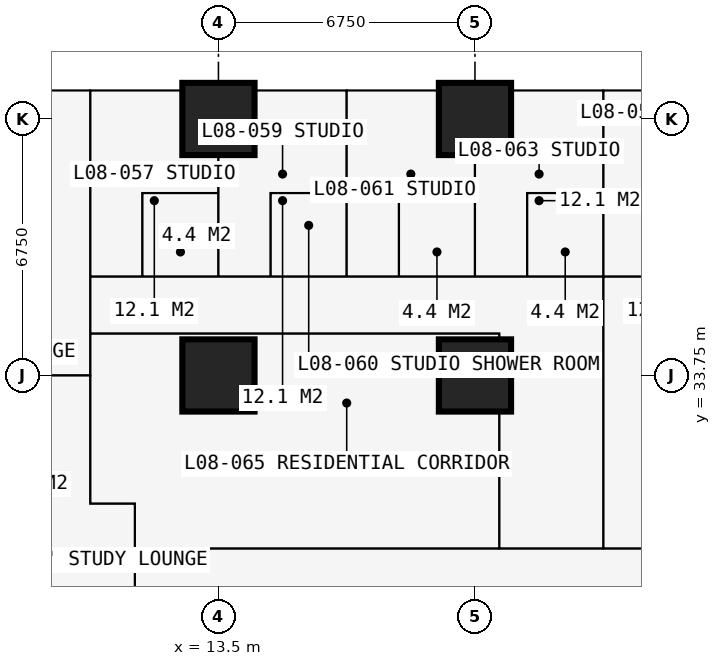
"""IFC4 building model, lengths in metres.
Left out: names, types, materials, properties, quantities, classifications, styles, units other than length and angle.
Written with IfcOpenShell. Run it as: python <this file> out.ifc"""

import sys

from ifc_helpers import new_model, si_unit, direction, frame, frame_2d, origin, origin_2d, place, context, subcontext, project, spatial, rectangle, extrude, element, fill, save


model = new_model("IFC4")
c1 = context("Model", 3, precision=1e-05, world=origin(), true_north=direction((0.0, 1.0)))
c2 = subcontext(c1, "Body", "Model", "MODEL_VIEW")
j1 = project(units=[si_unit("LENGTHUNIT", "METRE"), si_unit("PLANEANGLEUNIT", "RADIAN")], contexts=[c1])
p1 = place(None, origin())
s1 = spatial("IfcSite", under=j1, at=p1, CompositionType="ELEMENT")
p2 = place(p1, origin())
s2 = spatial("IfcBuilding", under=s1, at=p2, CompositionType="ELEMENT")
p3 = place(p2, frame((0.0, 0.0, 32.4)))
s3 = spatial("IfcBuildingStorey", under=s2, at=p3, CompositionType="ELEMENT", Elevation=32.4)
for number, where, z_axis, x_axis in (
    (1, (13.5, 33.75, 0.0), (0.0, 0.0, 1.0), (1.0, 0.0, 0.0)),
    (2, (13.5, 40.5, 0.0), (0.0, 0.0, 1.0), (1.0, 0.0, 0.0)),
    (3, (20.25, 33.75, 0.0), (0.0, 0.0, 1.0), (1.0, 0.0, 0.0)),
    (4, (20.25, 40.5, 0.0), (0.0, 0.0, 1.0), (1.0, 0.0, 0.0)),
):
    element("IfcColumn", number, at=place(p3, frame(where, z_axis=z_axis, x_axis=x_axis)), inside=s3, PredefinedType="COLUMN", context=c2, shape_type="SweptSolid", body=[
        extrude(rectangle(XDim=1.9, YDim=1.9, at=origin_2d()), origin(), (0.0, 0.0, 1.0), 3.6),
    ])
p4 = place(p3, frame((13.5, 41.25, 0.0), z_axis=(0.0, 0.0, 1.0), x_axis=(1.0, 0.0, 0.0)))
e5 = element("IfcWall", 5, at=p4, inside=s3, PredefinedType="SOLIDWALL", context=c2, shape_type="SweptSolid", body=[
    extrude(rectangle(XDim=6.75, YDim=0.15, at=frame_2d((3.375, 0.0))), origin(), (0.0, 0.0, 1.0), 3.375),
])
p5 = place(p4, frame((0.996, 0.0, 0.0)))
e6 = element("IfcOpeningElement", 6, at=p5, cuts=e5, PredefinedType="OPENING", context=c2, shape_type="SweptSolid", body=[
    extrude(rectangle(XDim=1.0, YDim=2.2, at=frame_2d((0.5, 1.1))), frame((0.0, 0.085, 0.0), z_axis=(0.0, -1.0, 0.0), x_axis=(1.0, 0.0, 0.0)), (0.0, 0.0, 1.0), 0.17),
])
p6 = place(p4, frame((2.042, 0.0, 0.9)))
e7 = element("IfcOpeningElement", 7, at=p6, cuts=e5, PredefinedType="OPENING", context=c2, shape_type="SweptSolid", body=[
    extrude(rectangle(XDim=1.2, YDim=1.8, at=frame_2d((0.6, 0.9))), frame((0.0, 0.085, 0.0), z_axis=(0.0, -1.0, 0.0), x_axis=(1.0, 0.0, 0.0)), (0.0, 0.0, 1.0), 0.17),
])
p7 = place(p4, frame((4.754, 0.0, 0.0)))
e8 = element("IfcOpeningElement", 8, at=p7, cuts=e5, PredefinedType="OPENING", context=c2, shape_type="SweptSolid", body=[
    extrude(rectangle(XDim=1.0, YDim=2.2, at=frame_2d((0.5, 1.1))), frame((0.0, 0.085, 0.0), z_axis=(0.0, -1.0, 0.0), x_axis=(1.0, 0.0, 0.0)), (0.0, 0.0, 1.0), 0.17),
])
p8 = place(p4, frame((3.508, 0.0, 0.9)))
e9 = element("IfcOpeningElement", 9, at=p8, cuts=e5, PredefinedType="OPENING", context=c2, shape_type="SweptSolid", body=[
    extrude(rectangle(XDim=1.2, YDim=1.8, at=frame_2d((0.6, 0.9))), frame((0.0, 0.085, 0.0), z_axis=(0.0, -1.0, 0.0), x_axis=(1.0, 0.0, 0.0)), (0.0, 0.0, 1.0), 0.17),
])
p9 = place(p3, frame((16.875, 41.35, 0.0), z_axis=(0.0, 0.0, 1.0), x_axis=(0.0, 1.0, 0.0)))
e10 = element("IfcWall", 10, at=p9, inside=s3, PredefinedType="USERDEFINED", context=c2, shape_type="SweptSolid", body=[
    extrude(rectangle(XDim=2.2, YDim=1.0, at=frame_2d((1.1, 0.0))), origin(), (0.0, 0.0, 1.0), 0.9),
])
p10 = place(p3, frame((4.15, 33.75, 0.0), z_axis=(0.0, 0.0, 1.0), x_axis=(1.0, 0.0, 0.0)))
e11 = element("IfcWall", 11, at=p10, inside=s3, PredefinedType="PARTITIONING", context=c2, shape_type="SweptSolid", body=[
    extrude(rectangle(XDim=5.975, YDim=0.15, at=frame_2d((2.988, 0.0))), origin(), (0.0, 0.0, 1.0), 2.877),
])
p11 = place(p3, frame((10.125, 30.375, 0.0), z_axis=(0.0, 0.0, 1.0), x_axis=(0.0, 1.0, 0.0)))
e12 = element("IfcWall", 12, at=p11, inside=s3, PredefinedType="PARTITIONING", context=c2, shape_type="SweptSolid", body=[
    extrude(rectangle(XDim=10.859, YDim=0.15, at=frame_2d((5.429, 0.0))), origin(), (0.0, 0.0, 1.0), 3.375),
])
p12 = place(p3, frame((10.125, 30.375, 0.0), z_axis=(0.0, 0.0, 1.0), x_axis=(1.0, 0.0, 0.0)))
e13 = element("IfcWall", 13, at=p12, inside=s3, PredefinedType="PARTITIONING", context=c2, shape_type="SweptSolid", body=[
    extrude(rectangle(XDim=1.175, YDim=0.15, at=frame_2d((0.587, 0.0))), origin(), (0.0, 0.0, 1.0), 3.375),
])
p13 = place(p3, frame((10.125, 34.85, 0.0), z_axis=(0.0, 0.0, 1.0), x_axis=(1.0, 0.0, 0.0)))
e14 = element("IfcWall", 14, at=p13, inside=s3, PredefinedType="PARTITIONING", context=c2, shape_type="SweptSolid", body=[
    extrude(rectangle(XDim=10.762, YDim=0.15, at=frame_2d((5.381, 0.0))), origin(), (0.0, 0.0, 1.0), 3.375),
])
p14 = place(p13, frame((4.9, 0.0, 0.0)))
e15 = element("IfcOpeningElement", 15, at=p14, cuts=e14, PredefinedType="OPENING", context=c2, shape_type="SweptSolid", body=[
    extrude(rectangle(XDim=0.95, YDim=2.2, at=frame_2d((0.475, 1.1))), frame((0.0, 0.085, 0.0), z_axis=(0.0, -1.0, 0.0), x_axis=(1.0, 0.0, 0.0)), (0.0, 0.0, 1.0), 0.17),
])
p15 = place(p3, frame((10.125, 36.35, 0.0), z_axis=(0.0, 0.0, 1.0), x_axis=(1.0, 0.0, 0.0)))
e16 = element("IfcWall", 16, at=p15, inside=s3, PredefinedType="PARTITIONING", context=c2, shape_type="SweptSolid", body=[
    extrude(rectangle(XDim=23.625, YDim=0.1, at=frame_2d((11.812, 0.0))), origin(), (0.0, 0.0, 1.0), 3.375),
])
p16 = place(p15, frame((20.5, 0.0, 0.0)))
e17 = element("IfcOpeningElement", 17, at=p16, cuts=e16, PredefinedType="OPENING", context=c2, shape_type="SweptSolid", body=[
    extrude(rectangle(XDim=0.95, YDim=2.2, at=frame_2d((0.475, 1.1))), frame((0.0, 0.06, 0.0), z_axis=(0.0, -1.0, 0.0), x_axis=(1.0, 0.0, 0.0)), (0.0, 0.0, 1.0), 0.12),
])
p17 = place(p15, frame((17.125, 0.0, 0.0)))
e18 = element("IfcOpeningElement", 18, at=p17, cuts=e16, PredefinedType="OPENING", context=c2, shape_type="SweptSolid", body=[
    extrude(rectangle(XDim=0.95, YDim=2.2, at=frame_2d((0.475, 1.1))), frame((0.0, 0.06, 0.0), z_axis=(0.0, -1.0, 0.0), x_axis=(1.0, 0.0, 0.0)), (0.0, 0.0, 1.0), 0.12),
])
p18 = place(p15, frame((13.7, 0.0, 0.0)))
e19 = element("IfcOpeningElement", 19, at=p18, cuts=e16, PredefinedType="OPENING", context=c2, shape_type="SweptSolid", body=[
    extrude(rectangle(XDim=0.95, YDim=2.2, at=frame_2d((0.475, 1.1))), frame((0.0, 0.06, 0.0), z_axis=(0.0, -1.0, 0.0), x_axis=(1.0, 0.0, 0.0)), (0.0, 0.0, 1.0), 0.12),
])
p19 = place(p15, frame((0.2, 0.0, 0.0)))
e20 = element("IfcOpeningElement", 20, at=p19, cuts=e16, PredefinedType="OPENING", context=c2, shape_type="SweptSolid", body=[
    extrude(rectangle(XDim=0.95, YDim=2.2, at=frame_2d((0.475, 1.1))), frame((0.0, 0.06, 0.0), z_axis=(0.0, -1.0, 0.0), x_axis=(1.0, 0.0, 0.0)), (0.0, 0.0, 1.0), 0.12),
])
p20 = place(p15, frame((3.625, 0.0, 0.0)))
e21 = element("IfcOpeningElement", 21, at=p20, cuts=e16, PredefinedType="OPENING", context=c2, shape_type="SweptSolid", body=[
    extrude(rectangle(XDim=0.95, YDim=2.2, at=frame_2d((0.475, 1.1))), frame((0.0, 0.06, 0.0), z_axis=(0.0, -1.0, 0.0), x_axis=(1.0, 0.0, 0.0)), (0.0, 0.0, 1.0), 0.12),
])
p21 = place(p15, frame((7.0, 0.0, 0.0)))
e22 = element("IfcOpeningElement", 22, at=p21, cuts=e16, PredefinedType="OPENING", context=c2, shape_type="SweptSolid", body=[
    extrude(rectangle(XDim=0.95, YDim=2.2, at=frame_2d((0.475, 1.1))), frame((0.0, 0.06, 0.0), z_axis=(0.0, -1.0, 0.0), x_axis=(1.0, 0.0, 0.0)), (0.0, 0.0, 1.0), 0.12),
])
p22 = place(p15, frame((10.375, 0.0, 0.0)))
e23 = element("IfcOpeningElement", 23, at=p22, cuts=e16, PredefinedType="OPENING", context=c2, shape_type="SweptSolid", body=[
    extrude(rectangle(XDim=0.95, YDim=2.2, at=frame_2d((0.475, 1.1))), frame((0.0, 0.06, 0.0), z_axis=(0.0, -1.0, 0.0), x_axis=(1.0, 0.0, 0.0)), (0.0, 0.0, 1.0), 0.12),
])
p23 = place(p3, frame((11.3, 11.3, 0.0), z_axis=(0.0, 0.0, 1.0), x_axis=(0.0, 1.0, 0.0)))
e24 = element("IfcWall", 24, at=p23, inside=s3, PredefinedType="PARTITIONING", context=c2, shape_type="SweptSolid", body=[
    extrude(rectangle(XDim=19.075, YDim=0.15, at=frame_2d((9.538, 0.0))), origin(), (0.0, 0.0, 1.0), 3.375),
])
p24 = place(p23, frame((12.875, 0.0, 0.0)))
e25 = element("IfcOpeningElement", 25, at=p24, cuts=e24, PredefinedType="OPENING", context=c2, shape_type="SweptSolid", body=[
    extrude(rectangle(XDim=1.0, YDim=2.2, at=frame_2d((0.5, 1.1))), frame((0.0, 0.085, 0.0), z_axis=(0.0, -1.0, 0.0), x_axis=(1.0, 0.0, 0.0)), (0.0, 0.0, 1.0), 0.17),
])
p25 = place(p23, frame((10.438, 0.0, 0.0)))
e26 = element("IfcOpeningElement", 26, at=p25, cuts=e24, PredefinedType="OPENING", context=c2, shape_type="SweptSolid", body=[
    extrude(rectangle(XDim=1.0, YDim=2.2, at=frame_2d((0.5, 1.1))), frame((0.0, 0.085, 0.0), z_axis=(0.0, -1.0, 0.0), x_axis=(1.0, 0.0, 0.0)), (0.0, 0.0, 1.0), 0.17),
])
p26 = place(p23, frame((15.675, 0.0, 0.0)))
e27 = element("IfcOpeningElement", 27, at=p26, cuts=e24, PredefinedType="OPENING", context=c2, shape_type="SweptSolid", body=[
    extrude(rectangle(XDim=0.95, YDim=2.2, at=frame_2d((0.475, 1.1))), frame((0.0, 0.085, 0.0), z_axis=(0.0, -1.0, 0.0), x_axis=(1.0, 0.0, 0.0)), (0.0, 0.0, 1.0), 0.17),
])
p27 = place(p3, frame((11.3, 29.2, 0.0), z_axis=(0.0, 0.0, 1.0), x_axis=(1.0, 0.0, 0.0)))
e28 = element("IfcWall", 28, at=p27, inside=s3, PredefinedType="PARTITIONING", context=c2, shape_type="SweptSolid", body=[
    extrude(rectangle(XDim=19.075, YDim=0.15, at=frame_2d((9.538, 0.0))), origin(), (0.0, 0.0, 1.0), 3.375),
])
p28 = place(p27, frame((12.875, 0.0, 0.0)))
e29 = element("IfcOpeningElement", 29, at=p28, cuts=e28, PredefinedType="OPENING", context=c2, shape_type="SweptSolid", body=[
    extrude(rectangle(XDim=1.0, YDim=2.2, at=frame_2d((0.5, 1.1))), frame((0.0, 0.085, 0.0), z_axis=(0.0, -1.0, 0.0), x_axis=(1.0, 0.0, 0.0)), (0.0, 0.0, 1.0), 0.17),
])
p29 = place(p27, frame((10.438, 0.0, 0.0)))
e30 = element("IfcOpeningElement", 30, at=p29, cuts=e28, PredefinedType="OPENING", context=c2, shape_type="SweptSolid", body=[
    extrude(rectangle(XDim=1.0, YDim=2.2, at=frame_2d((0.5, 1.1))), frame((0.0, 0.085, 0.0), z_axis=(0.0, -1.0, 0.0), x_axis=(1.0, 0.0, 0.0)), (0.0, 0.0, 1.0), 0.17),
])
p30 = place(p27, frame((15.675, 0.0, 0.0)))
e31 = element("IfcOpeningElement", 31, at=p30, cuts=e28, PredefinedType="OPENING", context=c2, shape_type="SweptSolid", body=[
    extrude(rectangle(XDim=0.95, YDim=2.2, at=frame_2d((0.475, 1.1))), frame((0.0, 0.085, 0.0), z_axis=(0.0, -1.0, 0.0), x_axis=(1.0, 0.0, 0.0)), (0.0, 0.0, 1.0), 0.17),
])
p31 = place(p3, frame((11.5, 36.35, 0.0), z_axis=(0.0, 0.0, 1.0), x_axis=(0.0, 1.0, 0.0)))
e32 = element("IfcWall", 32, at=p31, inside=s3, PredefinedType="PARTITIONING", context=c2, shape_type="SweptSolid", body=[
    extrude(rectangle(XDim=2.2, YDim=0.1, at=frame_2d((1.1, 0.0))), origin(), (0.0, 0.0, 1.0), 3.375),
])
p32 = place(p31, frame((0.65, 0.0, 0.0)))
e33 = element("IfcOpeningElement", 33, at=p32, cuts=e32, PredefinedType="OPENING", context=c2, shape_type="SweptSolid", body=[
    extrude(rectangle(XDim=0.9, YDim=2.2, at=frame_2d((0.45, 1.1))), frame((0.0, 0.06, 0.0), z_axis=(0.0, -1.0, 0.0), x_axis=(1.0, 0.0, 0.0)), (0.0, 0.0, 1.0), 0.12),
])
p33 = place(p3, frame((11.5, 38.55, 0.0), z_axis=(0.0, 0.0, 1.0), x_axis=(1.0, 0.0, 0.0)))
e34 = element("IfcWall", 34, at=p33, inside=s3, PredefinedType="PARTITIONING", context=c2, shape_type="SweptSolid", body=[
    extrude(rectangle(XDim=2.0, YDim=0.1, at=frame_2d((1.0, 0.0))), origin(), (0.0, 0.0, 1.0), 3.375),
])
p34 = place(p3, frame((13.5, 36.35, 0.0), z_axis=(0.0, 0.0, 1.0), x_axis=(0.0, 1.0, 0.0)))
e35 = element("IfcWall", 35, at=p34, inside=s3, PredefinedType="PARTITIONING", context=c2, shape_type="SweptSolid", body=[
    extrude(rectangle(XDim=4.884, YDim=0.175, at=frame_2d((2.442, 0.0))), origin(), (0.0, 0.0, 1.0), 2.877),
])
p35 = place(p3, frame((14.875, 36.35, 0.0), z_axis=(0.0, 0.0, 1.0), x_axis=(0.0, 1.0, 0.0)))
e36 = element("IfcWall", 36, at=p35, inside=s3, PredefinedType="PARTITIONING", context=c2, shape_type="SweptSolid", body=[
    extrude(rectangle(XDim=2.2, YDim=0.1, at=frame_2d((1.1, 0.0))), origin(), (0.0, 0.0, 1.0), 3.375),
])
p36 = place(p35, frame((0.65, 0.0, 0.0)))
e37 = element("IfcOpeningElement", 37, at=p36, cuts=e36, PredefinedType="OPENING", context=c2, shape_type="SweptSolid", body=[
    extrude(rectangle(XDim=0.9, YDim=2.2, at=frame_2d((0.45, 1.1))), frame((0.0, 0.06, 0.0), z_axis=(0.0, -1.0, 0.0), x_axis=(1.0, 0.0, 0.0)), (0.0, 0.0, 1.0), 0.12),
])
p37 = place(p3, frame((14.875, 38.55, 0.0), z_axis=(0.0, 0.0, 1.0), x_axis=(1.0, 0.0, 0.0)))
e38 = element("IfcWall", 38, at=p37, inside=s3, PredefinedType="PARTITIONING", context=c2, shape_type="SweptSolid", body=[
    extrude(rectangle(XDim=2.0, YDim=0.1, at=frame_2d((1.0, 0.0))), origin(), (0.0, 0.0, 1.0), 3.375),
])
p38 = place(p3, frame((16.875, 36.35, 0.0), z_axis=(0.0, 0.0, 1.0), x_axis=(0.0, 1.0, 0.0)))
e39 = element("IfcWall", 39, at=p38, inside=s3, PredefinedType="PARTITIONING", context=c2, shape_type="SweptSolid", body=[
    extrude(rectangle(XDim=4.884, YDim=0.175, at=frame_2d((2.442, 0.0))), origin(), (0.0, 0.0, 1.0), 3.375),
])
p39 = place(p3, frame((18.25, 36.35, 0.0), z_axis=(0.0, 0.0, 1.0), x_axis=(0.0, 1.0, 0.0)))
e40 = element("IfcWall", 40, at=p39, inside=s3, PredefinedType="PARTITIONING", context=c2, shape_type="SweptSolid", body=[
    extrude(rectangle(XDim=2.2, YDim=0.1, at=frame_2d((1.1, 0.0))), origin(), (0.0, 0.0, 1.0), 3.375),
])
p40 = place(p39, frame((0.65, 0.0, 0.0)))
e41 = element("IfcOpeningElement", 41, at=p40, cuts=e40, PredefinedType="OPENING", context=c2, shape_type="SweptSolid", body=[
    extrude(rectangle(XDim=0.9, YDim=2.2, at=frame_2d((0.45, 1.1))), frame((0.0, 0.06, 0.0), z_axis=(0.0, -1.0, 0.0), x_axis=(1.0, 0.0, 0.0)), (0.0, 0.0, 1.0), 0.12),
])
p41 = place(p3, frame((18.25, 38.55, 0.0), z_axis=(0.0, 0.0, 1.0), x_axis=(1.0, 0.0, 0.0)))
e42 = element("IfcWall", 42, at=p41, inside=s3, PredefinedType="PARTITIONING", context=c2, shape_type="SweptSolid", body=[
    extrude(rectangle(XDim=2.0, YDim=0.1, at=frame_2d((1.0, 0.0))), origin(), (0.0, 0.0, 1.0), 3.375),
])
p42 = place(p3, frame((20.25, 36.35, 0.0), z_axis=(0.0, 0.0, 1.0), x_axis=(0.0, 1.0, 0.0)))
e43 = element("IfcWall", 43, at=p42, inside=s3, PredefinedType="PARTITIONING", context=c2, shape_type="SweptSolid", body=[
    extrude(rectangle(XDim=4.884, YDim=0.175, at=frame_2d((2.442, 0.0))), origin(), (0.0, 0.0, 1.0), 2.61),
])
p43 = place(p3, frame((20.887, 29.2, 0.0), z_axis=(0.0, 0.0, 1.0), x_axis=(0.0, 1.0, 0.0)))
e44 = element("IfcWall", 44, at=p43, inside=s3, PredefinedType="PARTITIONING", context=c2, shape_type="SweptSolid", body=[
    extrude(rectangle(XDim=5.65, YDim=0.15, at=frame_2d((2.825, 0.0))), origin(), (0.0, 0.0, 1.0), 3.375),
])
p44 = place(p3, frame((21.625, 36.35, 0.0), z_axis=(0.0, 0.0, 1.0), x_axis=(0.0, 1.0, 0.0)))
e45 = element("IfcWall", 45, at=p44, inside=s3, PredefinedType="PARTITIONING", context=c2, shape_type="SweptSolid", body=[
    extrude(rectangle(XDim=2.2, YDim=0.1, at=frame_2d((1.1, 0.0))), origin(), (0.0, 0.0, 1.0), 3.375),
])
p45 = place(p44, frame((0.65, 0.0, 0.0)))
e46 = element("IfcOpeningElement", 46, at=p45, cuts=e45, PredefinedType="OPENING", context=c2, shape_type="SweptSolid", body=[
    extrude(rectangle(XDim=0.9, YDim=2.2, at=frame_2d((0.45, 1.1))), frame((0.0, 0.06, 0.0), z_axis=(0.0, -1.0, 0.0), x_axis=(1.0, 0.0, 0.0)), (0.0, 0.0, 1.0), 0.12),
])
p46 = place(p3, frame((21.625, 38.55, 0.0), z_axis=(0.0, 0.0, 1.0), x_axis=(1.0, 0.0, 0.0)))
e47 = element("IfcWall", 47, at=p46, inside=s3, PredefinedType="PARTITIONING", context=c2, shape_type="SweptSolid", body=[
    extrude(rectangle(XDim=2.0, YDim=0.1, at=frame_2d((1.0, 0.0))), origin(), (0.0, 0.0, 1.0), 3.375),
])
p47 = place(p3, frame((23.625, 29.2, 0.0), z_axis=(0.0, 0.0, 1.0), x_axis=(0.0, 1.0, 0.0)))
e48 = element("IfcWall", 48, at=p47, inside=s3, PredefinedType="PARTITIONING", context=c2, shape_type="SweptSolid", body=[
    extrude(rectangle(XDim=12.034, YDim=0.15, at=frame_2d((6.017, 0.0))), origin(), (0.0, 0.0, 1.0), 3.375),
])
p48 = place(p5, origin())
e49 = element("IfcDoor", 49, at=p48, inside=s3, OperationType="SINGLE_SWING_LEFT", PredefinedType="DOOR", context=c2, shape_type="SweptSolid", body=[
    extrude(rectangle(XDim=1.0, YDim=2.2, at=frame_2d((0.5, 1.1))), frame((0.0, 0.025, 0.0), z_axis=(0.0, -1.0, 0.0), x_axis=(1.0, 0.0, 0.0)), (0.0, 0.0, 1.0), 0.05),
])
fill(e6, e49)
p49 = place(p6, origin())
e50 = element("IfcWindow", 50, at=p49, inside=s3, PartitioningType="SINGLE_PANEL", PredefinedType="WINDOW", context=c2, shape_type="SweptSolid", body=[
    extrude(rectangle(XDim=1.2, YDim=1.8, at=frame_2d((0.6, 0.9))), frame((0.0, 0.03, 0.0), z_axis=(0.0, -1.0, 0.0), x_axis=(1.0, 0.0, 0.0)), (0.0, 0.0, 1.0), 0.06),
])
fill(e7, e50)
p50 = place(p7, origin())
e51 = element("IfcDoor", 51, at=p50, inside=s3, OperationType="SINGLE_SWING_RIGHT", PredefinedType="DOOR", context=c2, shape_type="SweptSolid", body=[
    extrude(rectangle(XDim=1.0, YDim=2.2, at=frame_2d((0.5, 1.1))), frame((0.0, 0.025, 0.0), z_axis=(0.0, -1.0, 0.0), x_axis=(1.0, 0.0, 0.0)), (0.0, 0.0, 1.0), 0.05),
])
fill(e8, e51)
p51 = place(p8, origin())
e52 = element("IfcWindow", 52, at=p51, inside=s3, PartitioningType="SINGLE_PANEL", PredefinedType="WINDOW", context=c2, shape_type="SweptSolid", body=[
    extrude(rectangle(XDim=1.2, YDim=1.8, at=frame_2d((0.6, 0.9))), frame((0.0, 0.03, 0.0), z_axis=(0.0, -1.0, 0.0), x_axis=(1.0, 0.0, 0.0)), (0.0, 0.0, 1.0), 0.06),
])
fill(e9, e52)
p52 = place(p18, origin())
e53 = element("IfcDoor", 53, at=p52, inside=s3, OperationType="SINGLE_SWING_LEFT", PredefinedType="DOOR", context=c2, shape_type="SweptSolid", body=[
    extrude(rectangle(XDim=0.95, YDim=2.2, at=frame_2d((0.475, 1.1))), frame((0.0, 0.025, 0.0), z_axis=(0.0, -1.0, 0.0), x_axis=(1.0, 0.0, 0.0)), (0.0, 0.0, 1.0), 0.05),
])
fill(e19, e53)
p53 = place(p28, origin())
e54 = element("IfcDoor", 54, at=p53, inside=s3, OperationType="SINGLE_SWING_LEFT", PredefinedType="DOOR", context=c2, shape_type="SweptSolid", body=[
    extrude(rectangle(XDim=1.0, YDim=2.2, at=frame_2d((0.5, 1.1))), frame((0.0, 0.025, 0.0), z_axis=(0.0, -1.0, 0.0), x_axis=(1.0, 0.0, 0.0)), (0.0, 0.0, 1.0), 0.05),
])
fill(e29, e54)
p54 = place(p19, origin())
e55 = element("IfcDoor", 55, at=p54, inside=s3, OperationType="SINGLE_SWING_LEFT", PredefinedType="DOOR", context=c2, shape_type="SweptSolid", body=[
    extrude(rectangle(XDim=0.95, YDim=2.2, at=frame_2d((0.475, 1.1))), frame((0.0, 0.025, 0.0), z_axis=(0.0, -1.0, 0.0), x_axis=(1.0, 0.0, 0.0)), (0.0, 0.0, 1.0), 0.05),
])
fill(e20, e55)
p55 = place(p32, origin())
e56 = element("IfcDoor", 56, at=p55, inside=s3, OperationType="SINGLE_SWING_RIGHT", PredefinedType="DOOR", context=c2, shape_type="SweptSolid", body=[
    extrude(rectangle(XDim=0.9, YDim=2.2, at=frame_2d((0.45, 1.1))), frame((0.0, 0.025, 0.0), z_axis=(0.0, -1.0, 0.0), x_axis=(1.0, 0.0, 0.0)), (0.0, 0.0, 1.0), 0.05),
])
fill(e33, e56)
p56 = place(p20, origin())
e57 = element("IfcDoor", 57, at=p56, inside=s3, OperationType="SINGLE_SWING_LEFT", PredefinedType="DOOR", context=c2, shape_type="SweptSolid", body=[
    extrude(rectangle(XDim=0.95, YDim=2.2, at=frame_2d((0.475, 1.1))), frame((0.0, 0.025, 0.0), z_axis=(0.0, -1.0, 0.0), x_axis=(1.0, 0.0, 0.0)), (0.0, 0.0, 1.0), 0.05),
])
fill(e21, e57)
p57 = place(p36, origin())
e58 = element("IfcDoor", 58, at=p57, inside=s3, OperationType="SINGLE_SWING_RIGHT", PredefinedType="DOOR", context=c2, shape_type="SweptSolid", body=[
    extrude(rectangle(XDim=0.9, YDim=2.2, at=frame_2d((0.45, 1.1))), frame((0.0, 0.025, 0.0), z_axis=(0.0, -1.0, 0.0), x_axis=(1.0, 0.0, 0.0)), (0.0, 0.0, 1.0), 0.05),
])
fill(e37, e58)
p58 = place(p21, origin())
e59 = element("IfcDoor", 59, at=p58, inside=s3, OperationType="SINGLE_SWING_LEFT", PredefinedType="DOOR", context=c2, shape_type="SweptSolid", body=[
    extrude(rectangle(XDim=0.95, YDim=2.2, at=frame_2d((0.475, 1.1))), frame((0.0, 0.025, 0.0), z_axis=(0.0, -1.0, 0.0), x_axis=(1.0, 0.0, 0.0)), (0.0, 0.0, 1.0), 0.05),
])
fill(e22, e59)
p59 = place(p40, origin())
e60 = element("IfcDoor", 60, at=p59, inside=s3, OperationType="SINGLE_SWING_RIGHT", PredefinedType="DOOR", context=c2, shape_type="SweptSolid", body=[
    extrude(rectangle(XDim=0.9, YDim=2.2, at=frame_2d((0.45, 1.1))), frame((0.0, 0.025, 0.0), z_axis=(0.0, -1.0, 0.0), x_axis=(1.0, 0.0, 0.0)), (0.0, 0.0, 1.0), 0.05),
])
fill(e41, e60)
p60 = place(p22, origin())
e61 = element("IfcDoor", 61, at=p60, inside=s3, OperationType="SINGLE_SWING_LEFT", PredefinedType="DOOR", context=c2, shape_type="SweptSolid", body=[
    extrude(rectangle(XDim=0.95, YDim=2.2, at=frame_2d((0.475, 1.1))), frame((0.0, 0.025, 0.0), z_axis=(0.0, -1.0, 0.0), x_axis=(1.0, 0.0, 0.0)), (0.0, 0.0, 1.0), 0.05),
])
fill(e23, e61)
p61 = place(p45, origin())
e62 = element("IfcDoor", 62, at=p61, inside=s3, OperationType="SINGLE_SWING_RIGHT", PredefinedType="DOOR", context=c2, shape_type="SweptSolid", body=[
    extrude(rectangle(XDim=0.9, YDim=2.2, at=frame_2d((0.45, 1.1))), frame((0.0, 0.025, 0.0), z_axis=(0.0, -1.0, 0.0), x_axis=(1.0, 0.0, 0.0)), (0.0, 0.0, 1.0), 0.05),
])
fill(e46, e62)
p62 = place(p29, origin())
e63 = element("IfcDoor", 63, at=p62, inside=s3, OperationType="SINGLE_SWING_LEFT", PredefinedType="DOOR", context=c2, shape_type="SweptSolid", body=[
    extrude(rectangle(XDim=1.0, YDim=2.2, at=frame_2d((0.5, 1.1))), frame((0.0, 0.025, 0.0), z_axis=(0.0, -1.0, 0.0), x_axis=(1.0, 0.0, 0.0)), (0.0, 0.0, 1.0), 0.05),
])
fill(e30, e63)
p63 = place(p14, origin())
e64 = element("IfcDoor", 64, at=p63, inside=s3, OperationType="SINGLE_SWING_LEFT", PredefinedType="DOOR", context=c2, shape_type="SweptSolid", body=[
    extrude(rectangle(XDim=0.95, YDim=2.2, at=frame_2d((0.475, 1.1))), frame((0.0, 0.025, 0.0), z_axis=(0.0, -1.0, 0.0), x_axis=(1.0, 0.0, 0.0)), (0.0, 0.0, 1.0), 0.05),
])
fill(e15, e64)
save(model, sys.argv[1])
